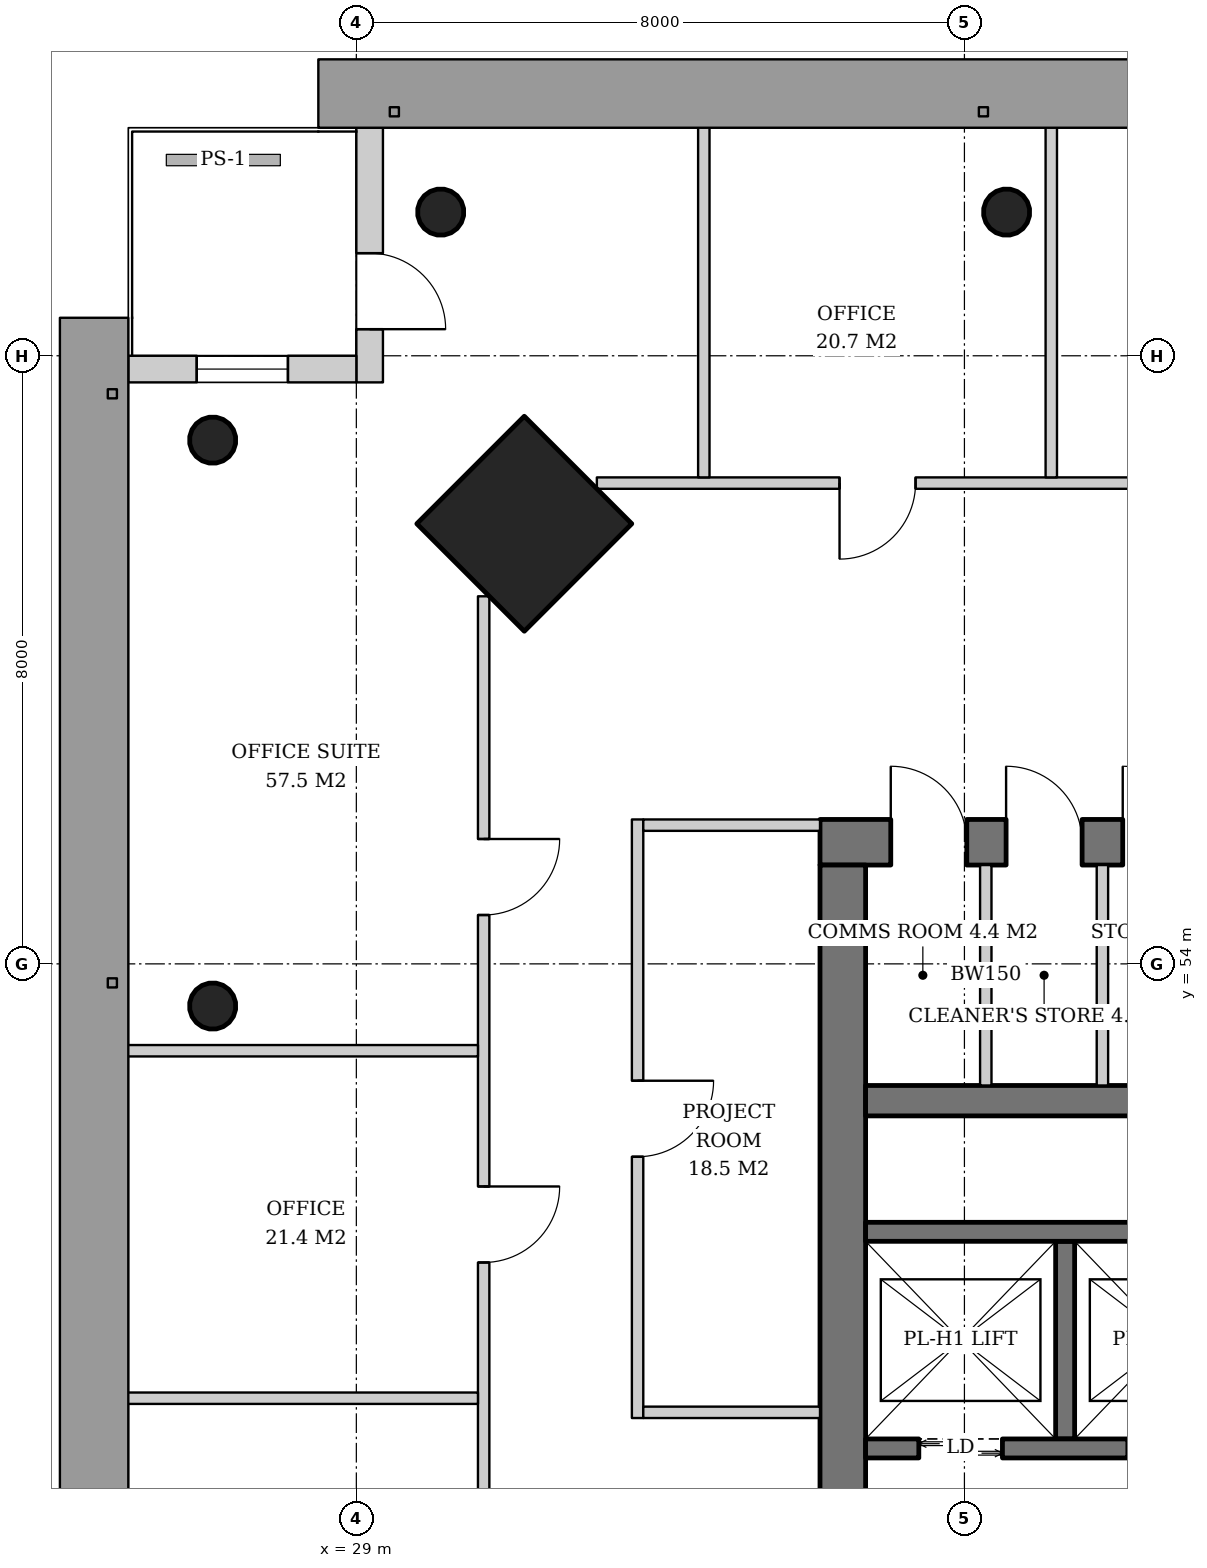
"""IFC4 building model, lengths in metres.
Left out: names, types, materials, properties, quantities, classifications, styles, units other than length and angle.
Written with IfcOpenShell. Run it as: python <this file> out.ifc"""

import sys

from ifc_helpers import new_model, si_unit, direction, frame, frame_2d, origin, origin_2d, place, context, subcontext, project, spatial, rectangle, hollow_circle, extrude, element, fill, save


model = new_model("IFC4")
c1 = context("Model", 3, precision=1e-05, world=origin(), true_north=direction((0.0, 1.0)))
c2 = subcontext(c1, "Body", "Model", "MODEL_VIEW")
j1 = project(units=[si_unit("LENGTHUNIT", "METRE"), si_unit("PLANEANGLEUNIT", "RADIAN")], contexts=[c1])
p1 = place(None, origin())
s1 = spatial("IfcSite", under=j1, at=p1, CompositionType="ELEMENT")
p2 = place(p1, origin())
s2 = spatial("IfcBuilding", under=s1, at=p2, CompositionType="ELEMENT")
p3 = place(p2, frame((0.0, 0.0, 211.0)))
s3 = spatial("IfcBuildingStorey", under=s2, at=p3, CompositionType="ELEMENT", Elevation=211.0)
p4 = place(p3, frame((31.171, 59.829, 0.0), z_axis=(0.031962158256, -0.031962158256, 0.998977898093), x_axis=(0.707106781187, 0.707106781187, 0.0)))
e1 = element("IfcColumn", 1, at=p4, inside=s3, PredefinedType="COLUMN", context=c2, shape_type="SweptSolid", body=[
    extrude(rectangle(XDim=2.0, YDim=2.0, at=origin_2d()), origin(), (0.0, 0.0, 1.0), 3.804),
])
p5 = place(p3, frame((30.072, 63.928, 0.0), z_axis=(0.031898107953, -0.031898107953, 0.998981992539), x_axis=(0.707106781187, 0.707106781187, 0.0)))
e2 = element("IfcColumn", 2, at=p5, inside=s3, PredefinedType="COLUMN", context=c2, shape_type="SweptSolid", body=[
    extrude(hollow_circle(Radius=0.305, WallThickness=0.025, at=origin_2d()), origin(), (0.0, 0.0, 1.0), 3.804),
])
p6 = place(p3, frame((37.536, 63.928, 0.0), z_axis=(0.015987237665, -0.031910269556, 0.999362868496), x_axis=(0.894067115991, 0.447933021895, 0.0)))
e3 = element("IfcColumn", 3, at=p6, inside=s3, PredefinedType="COLUMN", context=c2, shape_type="SweptSolid", body=[
    extrude(hollow_circle(Radius=0.305, WallThickness=0.025, at=origin_2d()), origin(), (0.0, 0.0, 1.0), 3.802),
])
p7 = place(p3, frame((27.072, 60.928, 0.0), z_axis=(0.031898107953, -0.031898107953, 0.998981992539), x_axis=(0.707106781187, 0.707106781187, 0.0)))
e4 = element("IfcColumn", 4, at=p7, inside=s3, PredefinedType="COLUMN", context=c2, shape_type="SweptSolid", body=[
    extrude(hollow_circle(Radius=0.305, WallThickness=0.025, at=origin_2d()), origin(), (0.0, 0.0, 1.0), 3.804),
])
p8 = place(p3, frame((27.072, 53.464, 0.0), z_axis=(0.031910269556, -0.015987237665, 0.999362868496), x_axis=(0.447933021895, 0.894067115991, 0.0)))
e5 = element("IfcColumn", 5, at=p8, inside=s3, PredefinedType="COLUMN", context=c2, shape_type="SweptSolid", body=[
    extrude(hollow_circle(Radius=0.305, WallThickness=0.025, at=origin_2d()), origin(), (0.0, 0.0, 1.0), 3.802),
])
p9 = place(p3, frame((35.1, 55.6, 0.0), z_axis=(0.0, 0.0, 1.0), x_axis=(1.0, 0.0, 0.0)))
e6 = element("IfcWall", 6, at=p9, inside=s3, PredefinedType="SHEAR", context=c2, shape_type="SweptSolid", body=[
    extrude(rectangle(XDim=19.8, YDim=0.6, at=frame_2d((9.9, 0.0))), origin(), (0.0, 0.0, 1.0), 3.8),
])
p10 = place(p9, frame((14.54, 0.0, 0.0)))
e7 = element("IfcOpeningElement", 7, at=p10, cuts=e6, PredefinedType="OPENING", context=c2, shape_type="SweptSolid", body=[
    extrude(rectangle(XDim=1.0, YDim=2.1, at=frame_2d((0.5, 1.05))), frame((0.0, 0.31, 0.0), z_axis=(0.0, -1.0, 0.0), x_axis=(1.0, 0.0, 0.0)), (0.0, 0.0, 1.0), 0.62),
])
p11 = place(p9, frame((0.931, 0.0, 0.0)))
e8 = element("IfcOpeningElement", 8, at=p11, cuts=e6, PredefinedType="OPENING", context=c2, shape_type="SweptSolid", body=[
    extrude(rectangle(XDim=1.0, YDim=2.1, at=frame_2d((0.5, 1.05))), frame((0.0, 0.31, 0.0), z_axis=(0.0, -1.0, 0.0), x_axis=(1.0, 0.0, 0.0)), (0.0, 0.0, 1.0), 0.62),
])
p12 = place(p9, frame((2.448, 0.0, 0.0)))
e9 = element("IfcOpeningElement", 9, at=p12, cuts=e6, PredefinedType="OPENING", context=c2, shape_type="SweptSolid", body=[
    extrude(rectangle(XDim=1.0, YDim=2.1, at=frame_2d((0.5, 1.05))), frame((0.0, 0.31, 0.0), z_axis=(0.0, -1.0, 0.0), x_axis=(1.0, 0.0, 0.0)), (0.0, 0.0, 1.0), 0.62),
])
p13 = place(p9, frame((3.983, 0.0, 0.0)))
e10 = element("IfcOpeningElement", 10, at=p13, cuts=e6, PredefinedType="OPENING", context=c2, shape_type="SweptSolid", body=[
    extrude(rectangle(XDim=1.0, YDim=2.1, at=frame_2d((0.5, 1.05))), frame((0.0, 0.31, 0.0), z_axis=(0.0, -1.0, 0.0), x_axis=(1.0, 0.0, 0.0)), (0.0, 0.0, 1.0), 0.62),
])
p14 = place(p3, frame((35.4, 36.7, 0.0), z_axis=(0.0, 0.0, 1.0), x_axis=(0.0, 1.0, 0.0)))
e11 = element("IfcWall", 11, at=p14, inside=s3, PredefinedType="SHEAR", context=c2, shape_type="SweptSolid", body=[
    extrude(rectangle(XDim=18.6, YDim=0.6, at=frame_2d((9.3, 0.0))), origin(), (0.0, 0.0, 1.0), 3.8),
])
p15 = place(p14, frame((8.4, 0.0, 0.0)))
e12 = element("IfcOpeningElement", 12, at=p15, cuts=e11, PredefinedType="OPENING", context=c2, shape_type="SweptSolid", body=[
    extrude(rectangle(XDim=1.8, YDim=2.4, at=frame_2d((0.9, 1.2))), frame((0.0, 0.31, 0.0), z_axis=(0.0, -1.0, 0.0), x_axis=(1.0, 0.0, 0.0)), (0.0, 0.0, 1.0), 0.62),
])
p16 = place(p3, frame((35.7, 52.2, 0.0), z_axis=(0.0, 0.0, 1.0), x_axis=(1.0, 0.0, 0.0)))
e13 = element("IfcWall", 13, at=p16, inside=s3, PredefinedType="SHEAR", context=c2, shape_type="SweptSolid", body=[
    extrude(rectangle(XDim=18.6, YDim=0.4, at=frame_2d((9.3, 0.0))), origin(), (0.0, 0.0, 1.0), 3.8),
])
p17 = place(p3, frame((29.175, 65.0, 0.0), z_axis=(0.0, 0.0, 1.0), x_axis=(0.0, -1.0, 0.0)))
e14 = element("IfcWall", 14, at=p17, inside=s3, PredefinedType="SOLIDWALL", context=c2, shape_type="SweptSolid", body=[
    extrude(rectangle(XDim=3.35, YDim=0.35, at=frame_2d((1.675, 0.0))), origin(), (0.0, 0.0, 1.0), 3.62),
])
p18 = place(p17, frame((1.65, 0.0, 0.0)))
e15 = element("IfcOpeningElement", 15, at=p18, cuts=e14, PredefinedType="OPENING", context=c2, shape_type="SweptSolid", body=[
    extrude(rectangle(XDim=1.0, YDim=2.4, at=frame_2d((0.5, 1.2))), frame((0.0, 0.185, 0.0), z_axis=(0.0, -1.0, 0.0), x_axis=(1.0, 0.0, 0.0)), (0.0, 0.0, 1.0), 0.37),
])
p19 = place(p3, frame((29.0, 61.825, 0.0), z_axis=(0.0, 0.0, 1.0), x_axis=(-1.0, 0.0, 0.0)))
e16 = element("IfcWall", 16, at=p19, inside=s3, PredefinedType="SOLIDWALL", context=c2, shape_type="SweptSolid", body=[
    extrude(rectangle(XDim=3.0, YDim=0.35, at=frame_2d((1.5, 0.0))), origin(), (0.0, 0.0, 1.0), 3.62),
])
p20 = place(p19, frame((0.9, 0.0, 0.6)))
e17 = element("IfcOpeningElement", 17, at=p20, cuts=e16, PredefinedType="OPENING", context=c2, shape_type="SweptSolid", body=[
    extrude(rectangle(XDim=1.2, YDim=2.55, at=frame_2d((0.6, 1.275))), frame((0.0, 0.185, 0.0), z_axis=(0.0, -1.0, 0.0), x_axis=(1.0, 0.0, 0.0)), (0.0, 0.0, 1.0), 0.37),
])
p21 = place(p3, frame((38.325, 47.75, 0.0), z_axis=(0.0, 0.0, 1.0), x_axis=(0.0, 1.0, 0.0)))
e18 = element("IfcWall", 18, at=p21, inside=s3, PredefinedType="SHEAR", context=c2, shape_type="SweptSolid", body=[
    extrude(rectangle(XDim=2.6, YDim=0.25, at=frame_2d((1.3, 0.0))), origin(), (0.0, 0.0, 1.0), 3.8),
])
p22 = place(p3, frame((35.7, 50.475, 0.0), z_axis=(0.0, 0.0, 1.0), x_axis=(1.0, 0.0, 0.0)))
e19 = element("IfcWall", 19, at=p22, inside=s3, PredefinedType="SHEAR", context=c2, shape_type="SweptSolid", body=[
    extrude(rectangle(XDim=11.0, YDim=0.25, at=frame_2d((5.5, 0.0))), origin(), (0.0, 0.0, 1.0), 3.8),
])
p23 = place(p3, frame((35.7, 47.625, 0.0), z_axis=(0.0, 0.0, 1.0), x_axis=(1.0, 0.0, 0.0)))
e20 = element("IfcWall", 20, at=p23, inside=s3, PredefinedType="SHEAR", context=c2, shape_type="SweptSolid", body=[
    extrude(rectangle(XDim=12.83, YDim=0.25, at=frame_2d((6.415, 0.0))), origin(), (0.0, 0.0, 1.0), 3.8),
])
p24 = place(p23, frame((0.7, 0.0, 0.0)))
e21 = element("IfcOpeningElement", 21, at=p24, cuts=e20, PredefinedType="OPENING", context=c2, shape_type="SweptSolid", body=[
    extrude(rectangle(XDim=1.1, YDim=2.2, at=frame_2d((0.55, 1.1))), frame((0.0, 0.135, 0.0), z_axis=(0.0, -1.0, 0.0), x_axis=(1.0, 0.0, 0.0)), (0.0, 0.0, 1.0), 0.27),
])
p25 = place(p23, frame((3.45, 0.0, 0.0)))
e22 = element("IfcOpeningElement", 22, at=p25, cuts=e20, PredefinedType="OPENING", context=c2, shape_type="SweptSolid", body=[
    extrude(rectangle(XDim=1.1, YDim=2.2, at=frame_2d((0.55, 1.1))), frame((0.0, 0.135, 0.0), z_axis=(0.0, -1.0, 0.0), x_axis=(1.0, 0.0, 0.0)), (0.0, 0.0, 1.0), 0.27),
])
p26 = place(p23, frame((6.2, 0.0, 0.0)))
e23 = element("IfcOpeningElement", 23, at=p26, cuts=e20, PredefinedType="OPENING", context=c2, shape_type="SweptSolid", body=[
    extrude(rectangle(XDim=1.1, YDim=2.2, at=frame_2d((0.55, 1.1))), frame((0.0, 0.135, 0.0), z_axis=(0.0, -1.0, 0.0), x_axis=(1.0, 0.0, 0.0)), (0.0, 0.0, 1.0), 0.27),
])
p27 = place(p23, frame((9.0, 0.0, 0.0)))
e24 = element("IfcOpeningElement", 24, at=p27, cuts=e20, PredefinedType="OPENING", context=c2, shape_type="SweptSolid", body=[
    extrude(rectangle(XDim=1.0, YDim=2.1, at=frame_2d((0.5, 1.05))), frame((0.0, 0.135, 0.0), z_axis=(0.0, -1.0, 0.0), x_axis=(1.0, 0.0, 0.0)), (0.0, 0.0, 1.0), 0.27),
])
p28 = place(p23, frame((11.515, 0.0, 0.0)))
e25 = element("IfcOpeningElement", 25, at=p28, cuts=e20, PredefinedType="OPENING", context=c2, shape_type="SweptSolid", body=[
    extrude(rectangle(XDim=0.8, YDim=2.0, at=frame_2d((0.4, 1.0))), frame((0.0, 0.135, 0.0), z_axis=(0.0, -1.0, 0.0), x_axis=(1.0, 0.0, 0.0)), (0.0, 0.0, 1.0), 0.27),
])
for number, where, z_axis, x_axis in (
    (26, (37.281, 52.4, 0.0), (0.0, 0.0, 1.0), (0.0, 1.0, 0.0)),
    (27, (38.815, 52.4, 0.0), (0.0, 0.0, 1.0), (0.0, 1.0, 0.0)),
):
    element("IfcWall", number, at=place(p3, frame(where, z_axis=z_axis, x_axis=x_axis)), inside=s3, PredefinedType="SOLIDWALL", context=c2, shape_type="SweptSolid", body=[
        extrude(rectangle(XDim=2.9, YDim=0.15, at=frame_2d((1.45, 0.0))), origin(), (0.0, 0.0, 1.0), 3.62),
    ])
p29 = place(p3, frame((32.7, 55.9, 0.0), z_axis=(0.0, 0.0, 1.0), x_axis=(0.0, -1.0, 0.0)))
e28 = element("IfcWall", 28, at=p29, inside=s3, PredefinedType="PARTITIONING", context=c2, shape_type="SweptSolid", body=[
    extrude(rectangle(XDim=7.875, YDim=0.15, at=frame_2d((3.938, 0.0))), origin(), (0.0, 0.0, 1.0), 2.867),
])
p30 = place(p29, frame((3.438, 0.0, 0.0)))
e29 = element("IfcOpeningElement", 29, at=p30, cuts=e28, PredefinedType="OPENING", context=c2, shape_type="SweptSolid", body=[
    extrude(rectangle(XDim=1.0, YDim=2.1, at=frame_2d((0.5, 1.05))), frame((0.0, 0.085, 0.0), z_axis=(0.0, -1.0, 0.0), x_axis=(1.0, 0.0, 0.0)), (0.0, 0.0, 1.0), 0.17),
])
p31 = place(p3, frame((35.1, 55.825, 0.0), z_axis=(0.0, 0.0, 1.0), x_axis=(-1.0, 0.0, 0.0)))
e30 = element("IfcWall", 30, at=p31, inside=s3, PredefinedType="PARTITIONING", context=c2, shape_type="SweptSolid", body=[
    extrude(rectangle(XDim=2.325, YDim=0.15, at=frame_2d((1.163, 0.0))), origin(), (0.0, 0.0, 1.0), 2.867),
])
p32 = place(p3, frame((35.1, 48.1, 0.0), z_axis=(0.0, 0.0, 1.0), x_axis=(-1.0, 0.0, 0.0)))
e31 = element("IfcWall", 31, at=p32, inside=s3, PredefinedType="PARTITIONING", context=c2, shape_type="SweptSolid", body=[
    extrude(rectangle(XDim=2.325, YDim=0.15, at=frame_2d((1.163, 0.0))), origin(), (0.0, 0.0, 1.0), 3.62),
])
p33 = place(p3, frame((57.836, 60.325, 0.0), z_axis=(0.0, 0.0, 1.0), x_axis=(-1.0, 0.0, 0.0)))
e32 = element("IfcWall", 32, at=p33, inside=s3, PredefinedType="PARTITIONING", context=c2, shape_type="SweptSolid", body=[
    extrude(rectangle(XDim=25.671, YDim=0.15, at=frame_2d((12.836, 0.0))), origin(), (0.0, 0.0, 1.0), 2.867),
])
p34 = place(p33, frame((3.193, 0.0, 0.0)))
e33 = element("IfcOpeningElement", 33, at=p34, cuts=e32, PredefinedType="OPENING", context=c2, shape_type="SweptSolid", body=[
    extrude(rectangle(XDim=1.0, YDim=2.1, at=frame_2d((0.5, 1.05))), frame((0.0, 0.085, 0.0), z_axis=(0.0, -1.0, 0.0), x_axis=(1.0, 0.0, 0.0)), (0.0, 0.0, 1.0), 0.17),
])
p35 = place(p33, frame((7.764, 0.0, 0.0)))
e34 = element("IfcOpeningElement", 34, at=p35, cuts=e32, PredefinedType="OPENING", context=c2, shape_type="SweptSolid", body=[
    extrude(rectangle(XDim=1.0, YDim=2.1, at=frame_2d((0.5, 1.05))), frame((0.0, 0.085, 0.0), z_axis=(0.0, -1.0, 0.0), x_axis=(1.0, 0.0, 0.0)), (0.0, 0.0, 1.0), 0.17),
])
p36 = place(p33, frame((12.336, 0.0, 0.0)))
e35 = element("IfcOpeningElement", 35, at=p36, cuts=e32, PredefinedType="OPENING", context=c2, shape_type="SweptSolid", body=[
    extrude(rectangle(XDim=1.0, YDim=2.1, at=frame_2d((0.5, 1.05))), frame((0.0, 0.085, 0.0), z_axis=(0.0, -1.0, 0.0), x_axis=(1.0, 0.0, 0.0)), (0.0, 0.0, 1.0), 0.17),
])
p37 = place(p33, frame((16.907, 0.0, 0.0)))
e36 = element("IfcOpeningElement", 36, at=p37, cuts=e32, PredefinedType="OPENING", context=c2, shape_type="SweptSolid", body=[
    extrude(rectangle(XDim=1.0, YDim=2.1, at=frame_2d((0.5, 1.05))), frame((0.0, 0.085, 0.0), z_axis=(0.0, -1.0, 0.0), x_axis=(1.0, 0.0, 0.0)), (0.0, 0.0, 1.0), 0.17),
])
p38 = place(p33, frame((21.479, 0.0, 0.0)))
e37 = element("IfcOpeningElement", 37, at=p38, cuts=e32, PredefinedType="OPENING", context=c2, shape_type="SweptSolid", body=[
    extrude(rectangle(XDim=1.0, YDim=2.1, at=frame_2d((0.5, 1.05))), frame((0.0, 0.085, 0.0), z_axis=(0.0, -1.0, 0.0), x_axis=(1.0, 0.0, 0.0)), (0.0, 0.0, 1.0), 0.17),
])
for number, where, z_axis, x_axis in (
    (38, (38.143, 60.4, 0.0), (0.0, 0.0, 1.0), (0.0, 1.0, 0.0)),
    (39, (33.572, 60.4, 0.0), (0.0, 0.0, 1.0), (0.0, 1.0, 0.0)),
):
    element("IfcWall", number, at=place(p3, frame(where, z_axis=z_axis, x_axis=x_axis)), inside=s3, PredefinedType="PARTITIONING", context=c2, shape_type="SweptSolid", body=[
        extrude(rectangle(XDim=4.64, YDim=0.15, at=frame_2d((2.32, 0.0))), origin(), (0.0, 0.0, 1.0), 3.12),
    ])
p39 = place(p3, frame((30.675, 58.836, 0.0), z_axis=(0.0, 0.0, 1.0), x_axis=(0.0, -1.0, 0.0)))
e40 = element("IfcWall", 40, at=p39, inside=s3, PredefinedType="PARTITIONING", context=c2, shape_type="SweptSolid", body=[
    extrude(rectangle(XDim=25.671, YDim=0.15, at=frame_2d((12.836, 0.0))), origin(), (0.0, 0.0, 1.0), 2.867),
])
p40 = place(p39, frame((3.193, 0.0, 0.0)))
e41 = element("IfcOpeningElement", 41, at=p40, cuts=e40, PredefinedType="OPENING", context=c2, shape_type="SweptSolid", body=[
    extrude(rectangle(XDim=1.0, YDim=2.1, at=frame_2d((0.5, 1.05))), frame((0.0, 0.085, 0.0), z_axis=(0.0, -1.0, 0.0), x_axis=(1.0, 0.0, 0.0)), (0.0, 0.0, 1.0), 0.17),
])
p41 = place(p39, frame((7.764, 0.0, 0.0)))
e42 = element("IfcOpeningElement", 42, at=p41, cuts=e40, PredefinedType="OPENING", context=c2, shape_type="SweptSolid", body=[
    extrude(rectangle(XDim=1.0, YDim=2.1, at=frame_2d((0.5, 1.05))), frame((0.0, 0.085, 0.0), z_axis=(0.0, -1.0, 0.0), x_axis=(1.0, 0.0, 0.0)), (0.0, 0.0, 1.0), 0.17),
])
p42 = place(p39, frame((12.436, 0.0, 0.0)))
e43 = element("IfcOpeningElement", 43, at=p42, cuts=e40, PredefinedType="OPENING", context=c2, shape_type="SweptSolid", body=[
    extrude(rectangle(XDim=0.8, YDim=2.1, at=frame_2d((0.4, 1.05))), frame((0.0, 0.085, 0.0), z_axis=(0.0, -1.0, 0.0), x_axis=(1.0, 0.0, 0.0)), (0.0, 0.0, 1.0), 0.17),
])
p43 = place(p39, frame((16.907, 0.0, 0.0)))
e44 = element("IfcOpeningElement", 44, at=p43, cuts=e40, PredefinedType="OPENING", context=c2, shape_type="SweptSolid", body=[
    extrude(rectangle(XDim=1.0, YDim=2.1, at=frame_2d((0.5, 1.05))), frame((0.0, 0.085, 0.0), z_axis=(0.0, -1.0, 0.0), x_axis=(1.0, 0.0, 0.0)), (0.0, 0.0, 1.0), 0.17),
])
p44 = place(p39, frame((21.579, 0.0, 0.0)))
e45 = element("IfcOpeningElement", 45, at=p44, cuts=e40, PredefinedType="OPENING", context=c2, shape_type="SweptSolid", body=[
    extrude(rectangle(XDim=0.8, YDim=2.1, at=frame_2d((0.4, 1.05))), frame((0.0, 0.085, 0.0), z_axis=(0.0, -1.0, 0.0), x_axis=(1.0, 0.0, 0.0)), (0.0, 0.0, 1.0), 0.17),
])
for number, where, z_axis, x_axis in (
    (46, (30.6, 52.857, 0.0), (0.0, 0.0, 1.0), (-1.0, 0.0, 0.0)),
    (47, (30.6, 48.286, 0.0), (0.0, 0.0, 1.0), (-1.0, 0.0, 0.0)),
):
    element("IfcWall", number, at=place(p3, frame(where, z_axis=z_axis, x_axis=x_axis)), inside=s3, PredefinedType="PARTITIONING", context=c2, shape_type="SweptSolid", body=[
        extrude(rectangle(XDim=4.64, YDim=0.15, at=frame_2d((2.32, 0.0))), origin(), (0.0, 0.0, 1.0), 3.12),
    ])
p45 = place(p18, origin())
e48 = element("IfcDoor", 48, at=p45, inside=s3, OperationType="SINGLE_SWING_RIGHT", PredefinedType="DOOR", context=c2, shape_type="SweptSolid", body=[
    extrude(rectangle(XDim=1.0, YDim=2.4, at=frame_2d((0.5, 1.2))), frame((0.0, 0.025, 0.0), z_axis=(0.0, -1.0, 0.0), x_axis=(1.0, 0.0, 0.0)), (0.0, 0.0, 1.0), 0.05),
])
fill(e15, e48)
p46 = place(p20, origin())
e49 = element("IfcWindow", 49, at=p46, inside=s3, PartitioningType="SINGLE_PANEL", PredefinedType="WINDOW", context=c2, shape_type="SweptSolid", body=[
    extrude(rectangle(XDim=1.2, YDim=2.55, at=frame_2d((0.6, 1.275))), frame((0.0, 0.03, 0.0), z_axis=(0.0, -1.0, 0.0), x_axis=(1.0, 0.0, 0.0)), (0.0, 0.0, 1.0), 0.06),
])
fill(e17, e49)
p47 = place(p24, origin())
e50 = element("IfcDoor", 50, at=p47, inside=s3, OperationType="DOUBLE_DOOR_SLIDING", PredefinedType="DOOR", context=c2, shape_type="SweptSolid", body=[
    extrude(rectangle(XDim=1.1, YDim=2.2, at=frame_2d((0.55, 1.1))), frame((0.0, 0.025, 0.0), z_axis=(0.0, -1.0, 0.0), x_axis=(1.0, 0.0, 0.0)), (0.0, 0.0, 1.0), 0.05),
])
fill(e21, e50)
p48 = place(p11, origin())
e51 = element("IfcDoor", 51, at=p48, inside=s3, OperationType="SINGLE_SWING_LEFT", PredefinedType="DOOR", context=c2, shape_type="SweptSolid", body=[
    extrude(rectangle(XDim=1.0, YDim=2.1, at=frame_2d((0.5, 1.05))), frame((0.0, -0.24, 0.0), z_axis=(0.0, -1.0, 0.0), x_axis=(1.0, 0.0, 0.0)), (0.0, 0.0, 1.0), 0.05),
])
fill(e8, e51)
p49 = place(p12, origin())
e52 = element("IfcDoor", 52, at=p49, inside=s3, OperationType="SINGLE_SWING_LEFT", PredefinedType="DOOR", context=c2, shape_type="SweptSolid", body=[
    extrude(rectangle(XDim=1.0, YDim=2.1, at=frame_2d((0.5, 1.05))), frame((0.0, -0.24, 0.0), z_axis=(0.0, -1.0, 0.0), x_axis=(1.0, 0.0, 0.0)), (0.0, 0.0, 1.0), 0.05),
])
fill(e9, e52)
p50 = place(p13, origin())
e53 = element("IfcDoor", 53, at=p50, inside=s3, OperationType="SINGLE_SWING_LEFT", PredefinedType="DOOR", context=c2, shape_type="SweptSolid", body=[
    extrude(rectangle(XDim=1.0, YDim=2.1, at=frame_2d((0.5, 1.05))), frame((0.0, -0.24, 0.0), z_axis=(0.0, -1.0, 0.0), x_axis=(1.0, 0.0, 0.0)), (0.0, 0.0, 1.0), 0.05),
])
fill(e10, e53)
p51 = place(p30, origin())
e54 = element("IfcDoor", 54, at=p51, inside=s3, OperationType="SINGLE_SWING_LEFT", PredefinedType="DOOR", context=c2, shape_type="SweptSolid", body=[
    extrude(rectangle(XDim=1.0, YDim=2.1, at=frame_2d((0.5, 1.05))), frame((0.0, 0.025, 0.0), z_axis=(0.0, -1.0, 0.0), x_axis=(1.0, 0.0, 0.0)), (0.0, 0.0, 1.0), 0.05),
])
fill(e29, e54)
p52 = place(p38, origin())
e55 = element("IfcDoor", 55, at=p52, inside=s3, OperationType="SINGLE_SWING_RIGHT", PredefinedType="DOOR", context=c2, shape_type="SweptSolid", body=[
    extrude(rectangle(XDim=1.0, YDim=2.1, at=frame_2d((0.5, 1.05))), frame((0.0, 0.025, 0.0), z_axis=(0.0, -1.0, 0.0), x_axis=(1.0, 0.0, 0.0)), (0.0, 0.0, 1.0), 0.05),
])
fill(e37, e55)
p53 = place(p40, origin())
e56 = element("IfcDoor", 56, at=p53, inside=s3, OperationType="SINGLE_SWING_LEFT", PredefinedType="DOOR", context=c2, shape_type="SweptSolid", body=[
    extrude(rectangle(XDim=1.0, YDim=2.1, at=frame_2d((0.5, 1.05))), frame((0.0, 0.025, 0.0), z_axis=(0.0, -1.0, 0.0), x_axis=(1.0, 0.0, 0.0)), (0.0, 0.0, 1.0), 0.05),
])
fill(e41, e56)
p54 = place(p41, origin())
e57 = element("IfcDoor", 57, at=p54, inside=s3, OperationType="SINGLE_SWING_LEFT", PredefinedType="DOOR", context=c2, shape_type="SweptSolid", body=[
    extrude(rectangle(XDim=1.0, YDim=2.1, at=frame_2d((0.5, 1.05))), frame((0.0, 0.025, 0.0), z_axis=(0.0, -1.0, 0.0), x_axis=(1.0, 0.0, 0.0)), (0.0, 0.0, 1.0), 0.05),
])
fill(e42, e57)
save(model, sys.argv[1])
